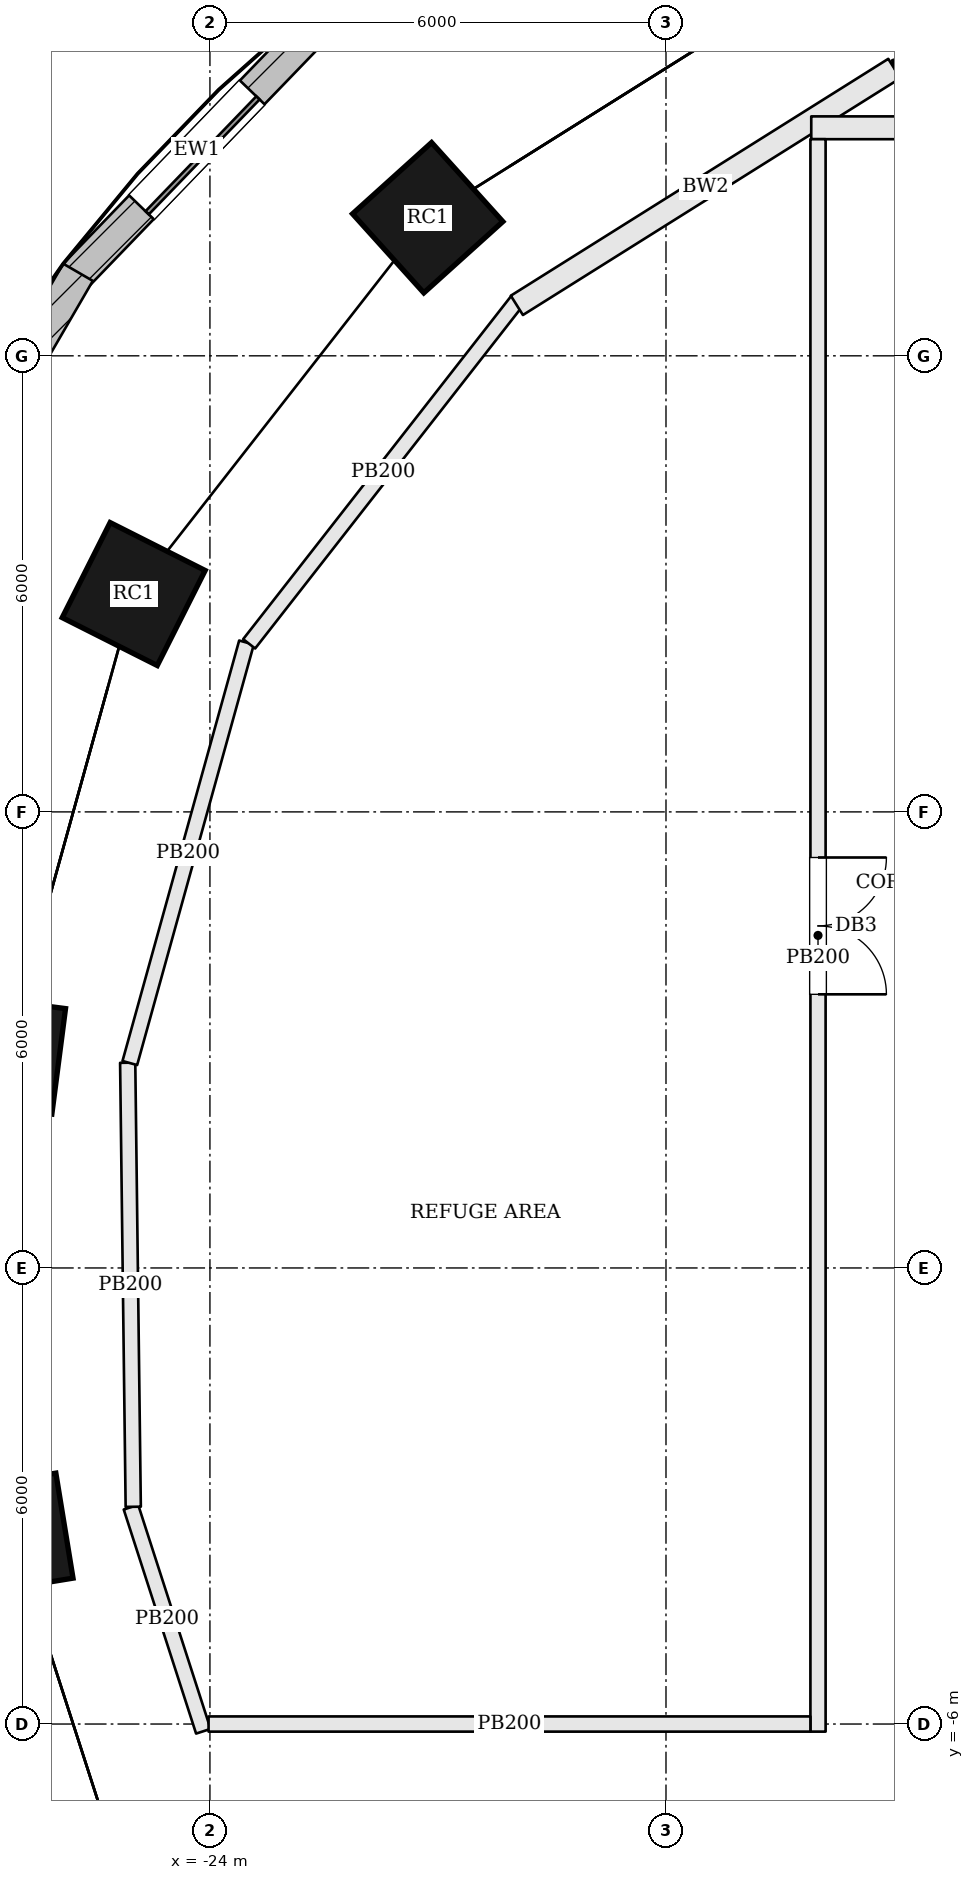
"""IFC4 building model, lengths in metres.
Left out: names, types, materials, properties, quantities, classifications, styles, units other than length and angle.
Written with IfcOpenShell. Run it as: python <this file> out.ifc"""

import sys

from ifc_helpers import new_model, si_unit, direction, frame, frame_2d, origin, origin_2d, place, context, subcontext, project, spatial, rectangle, extrude, element, fill, save


model = new_model("IFC4")
c1 = context("Model", 3, precision=1e-05, world=origin(), true_north=direction((0.0, 1.0)))
c2 = subcontext(c1, "Body", "Model", "MODEL_VIEW")
j1 = project(units=[si_unit("LENGTHUNIT", "METRE"), si_unit("PLANEANGLEUNIT", "RADIAN")], contexts=[c1])
p1 = place(None, origin())
s1 = spatial("IfcSite", under=j1, at=p1, CompositionType="ELEMENT")
p2 = place(p1, origin())
s2 = spatial("IfcBuilding", under=s1, at=p2, CompositionType="ELEMENT")
p3 = place(p2, frame((0.0, 0.0, 33.0)))
s3 = spatial("IfcBuildingStorey", under=s2, at=p3, CompositionType="ELEMENT", Elevation=33.0)
for number, where, z_axis, x_axis in (
    (1, (-21.135, 13.817, 0.0), (0.0, 0.0, 1.0), (-0.743, -0.67, 0.0)),
    (2, (-25.003, 8.866, 0.0), (0.0, 0.0, 1.0), (-0.45, -0.893, 0.0)),
    (3, (-26.684, 2.808, 0.0), (0.0, 0.0, 1.0), (-0.128, -0.992, 0.0)),
    (4, (-26.605, -3.503, 0.0), (0.0, 0.0, 1.0), (0.161, -0.987, 0.0)),
):
    element("IfcColumn", number, at=place(p3, frame(where, z_axis=z_axis, x_axis=x_axis)), inside=s3, PredefinedType="COLUMN", context=c2, shape_type="SweptSolid", body=[
        extrude(rectangle(XDim=1.4, YDim=1.4, at=origin_2d()), origin(), (0.0, 0.0, 1.0), 4.5),
    ])
p4 = place(p3, frame((-22.577, 16.365, 0.0), z_axis=(0.0, 0.0, 1.0), x_axis=(-0.694191591241, -0.719790271294, 0.0)))
e5 = element("IfcWall", 5, at=p4, inside=s3, PredefinedType="SOLIDWALL", context=c2, shape_type="SweptSolid", body=[
    extrude(rectangle(XDim=4.597, YDim=0.45, at=frame_2d((2.298, 0.0))), origin(), (0.0, 0.0, 1.0), 4.3),
])
p5 = place(p4, frame((1.249, 0.0, 1.2)))
e6 = element("IfcOpeningElement", 6, at=p5, cuts=e5, PredefinedType="OPENING", context=c2, shape_type="SweptSolid", body=[
    extrude(rectangle(XDim=2.1, YDim=1.8, at=frame_2d((1.05, 0.9))), frame((0.0, 0.235, 0.0), z_axis=(0.0, -1.0, 0.0), x_axis=(1.0, 0.0, 0.0)), (0.0, 0.0, 1.0), 0.47),
])
p6 = place(p3, frame((-25.735, 13.099, 0.0), z_axis=(0.0, 0.0, 1.0), x_axis=(-0.502106426501, -0.864805837438, 0.0)))
e7 = element("IfcWall", 7, at=p6, inside=s3, PredefinedType="SOLIDWALL", context=c2, shape_type="SweptSolid", body=[
    extrude(rectangle(XDim=4.657, YDim=0.45, at=frame_2d((2.328, 0.0))), origin(), (0.0, 0.0, 1.0), 4.3),
])
p7 = place(p6, frame((1.278, 0.0, 1.2)))
e8 = element("IfcOpeningElement", 8, at=p7, cuts=e7, PredefinedType="OPENING", context=c2, shape_type="SweptSolid", body=[
    extrude(rectangle(XDim=2.1, YDim=1.8, at=frame_2d((1.05, 0.9))), frame((0.0, 0.235, 0.0), z_axis=(0.0, -1.0, 0.0), x_axis=(1.0, 0.0, 0.0)), (0.0, 0.0, 1.0), 0.47),
])
p8 = place(p3, frame((-24.087, -6.095, 0.0), z_axis=(0.0, 0.0, 1.0), x_axis=(-0.307348144774, 0.951597140551, 0.0)))
e9 = element("IfcWall", 9, at=p8, inside=s3, PredefinedType="PARTITIONING", context=c2, shape_type="SweptSolid", body=[
    extrude(rectangle(XDim=3.098, YDim=0.2, at=frame_2d((1.549, 0.0))), origin(), (0.0, 0.0, 1.0), 4.3),
])
p9 = place(p3, frame((-25.009, -3.142, 0.0), z_axis=(0.0, 0.0, 1.0), x_axis=(-0.012494323245, 0.999921942897, 0.0)))
e10 = element("IfcWall", 10, at=p9, inside=s3, PredefinedType="PARTITIONING", context=c2, shape_type="SweptSolid", body=[
    extrude(rectangle(XDim=5.843, YDim=0.2, at=frame_2d((2.921, 0.0))), origin(), (0.0, 0.0, 1.0), 4.3),
])
p10 = place(p3, frame((-25.054, 2.696, 0.0), z_axis=(0.0, 0.0, 1.0), x_axis=(0.267360914268, 0.96359646197, 0.0)))
e11 = element("IfcWall", 11, at=p10, inside=s3, PredefinedType="PARTITIONING", context=c2, shape_type="SweptSolid", body=[
    extrude(rectangle(XDim=5.741, YDim=0.2, at=frame_2d((2.871, 0.0))), origin(), (0.0, 0.0, 1.0), 4.3),
])
p11 = place(p3, frame((-23.484, 8.211, 0.0), z_axis=(0.0, 0.0, 1.0), x_axis=(0.615543213925, 0.78810313525, 0.0)))
e12 = element("IfcWall", 12, at=p11, inside=s3, PredefinedType="PARTITIONING", context=c2, shape_type="SweptSolid", body=[
    extrude(rectangle(XDim=5.733, YDim=0.2, at=frame_2d((2.866, 0.0))), origin(), (0.0, 0.0, 1.0), 4.3),
])
p12 = place(p3, frame((-19.962, 12.664, 0.0), z_axis=(0.0, 0.0, 1.0), x_axis=(0.847051762776, 0.531510405522, 0.0)))
e13 = element("IfcWall", 13, at=p12, inside=s3, PredefinedType="SOLIDWALL", context=c2, shape_type="SweptSolid", body=[
    extrude(rectangle(XDim=5.863, YDim=0.3, at=frame_2d((2.931, 0.0))), origin(), (0.0, 0.0, 1.0), 4.3),
])
p13 = place(p3, frame((-16.089, 15.0, 0.0), z_axis=(0.0, 0.0, 1.0), x_axis=(1.0, 0.0, 0.0)))
e14 = element("IfcWall", 14, at=p13, inside=s3, PredefinedType="SOLIDWALL", context=c2, shape_type="SweptSolid", body=[
    extrude(rectangle(XDim=32.105, YDim=0.3, at=frame_2d((16.053, 0.0))), origin(), (0.0, 0.0, 1.0), 4.3),
])
p14 = place(p13, frame((3.089, 0.0, 0.0)))
e15 = element("IfcOpeningElement", 15, at=p14, cuts=e14, PredefinedType="OPENING", context=c2, shape_type="SweptSolid", body=[
    extrude(rectangle(XDim=1.0, YDim=2.1, at=frame_2d((0.5, 1.05))), frame((0.0, 0.16, 0.0), z_axis=(0.0, -1.0, 0.0), x_axis=(1.0, 0.0, 0.0)), (0.0, 0.0, 1.0), 0.32),
])
p15 = place(p13, frame((15.589, 0.0, 0.0)))
e16 = element("IfcOpeningElement", 16, at=p15, cuts=e14, PredefinedType="OPENING", context=c2, shape_type="SweptSolid", body=[
    extrude(rectangle(XDim=1.0, YDim=2.1, at=frame_2d((0.5, 1.05))), frame((0.0, 0.16, 0.0), z_axis=(0.0, -1.0, 0.0), x_axis=(1.0, 0.0, 0.0)), (0.0, 0.0, 1.0), 0.32),
])
p16 = place(p13, frame((28.089, 0.0, 0.0)))
e17 = element("IfcOpeningElement", 17, at=p16, cuts=e14, PredefinedType="OPENING", context=c2, shape_type="SweptSolid", body=[
    extrude(rectangle(XDim=1.0, YDim=2.1, at=frame_2d((0.5, 1.05))), frame((0.0, 0.16, 0.0), z_axis=(0.0, -1.0, 0.0), x_axis=(1.0, 0.0, 0.0)), (0.0, 0.0, 1.0), 0.32),
])
p17 = place(p3, frame((-16.0, 14.85, 0.0), z_axis=(0.0, 0.0, 1.0), x_axis=(0.0, -1.0, 0.0)))
e18 = element("IfcWall", 18, at=p17, inside=s3, PredefinedType="PARTITIONING", context=c2, shape_type="SweptSolid", body=[
    extrude(rectangle(XDim=20.95, YDim=0.2, at=frame_2d((10.475, 0.0))), origin(), (0.0, 0.0, 1.0), 4.3),
])
p18 = place(p17, frame((9.45, 0.0, 0.0)))
e19 = element("IfcOpeningElement", 19, at=p18, cuts=e18, PredefinedType="OPENING", context=c2, shape_type="SweptSolid", body=[
    extrude(rectangle(XDim=1.8, YDim=2.1, at=frame_2d((0.9, 1.05))), frame((0.0, 0.11, 0.0), z_axis=(0.0, -1.0, 0.0), x_axis=(1.0, 0.0, 0.0)), (0.0, 0.0, 1.0), 0.22),
])
p19 = place(p3, frame((-16.1, -6.0, 0.0), z_axis=(0.0, 0.0, 1.0), x_axis=(-1.0, 0.0, 0.0)))
e20 = element("IfcWall", 20, at=p19, inside=s3, PredefinedType="PARTITIONING", context=c2, shape_type="SweptSolid", body=[
    extrude(rectangle(XDim=7.918, YDim=0.2, at=frame_2d((3.959, 0.0))), origin(), (0.0, 0.0, 1.0), 4.3),
])
p20 = place(p3, frame((-14.98, 15.745, 0.0), z_axis=(0.0, 0.0, 1.0), x_axis=(0.953907270772, 0.300101514107, 0.0)))
e21 = element("IfcWall", 21, at=p20, inside=s3, PredefinedType="SOLIDWALL", context=c2, shape_type="SweptSolid", body=[
    extrude(rectangle(XDim=5.958, YDim=0.3, at=frame_2d((2.979, 0.0))), origin(), (0.0, 0.0, 1.0), 4.3),
])
p21 = place(p5, origin())
e22 = element("IfcWindow", 22, at=p21, inside=s3, PartitioningType="SINGLE_PANEL", PredefinedType="WINDOW", context=c2, shape_type="SweptSolid", body=[
    extrude(rectangle(XDim=2.1, YDim=1.8, at=frame_2d((1.05, 0.9))), frame((0.0, 0.135, 0.0), z_axis=(0.0, -1.0, 0.0), x_axis=(1.0, 0.0, 0.0)), (0.0, 0.0, 1.0), 0.06),
])
fill(e6, e22)
p22 = place(p18, origin())
e23 = element("IfcDoor", 23, at=p22, inside=s3, OperationType="DOUBLE_DOOR_SINGLE_SWING", PredefinedType="DOOR", context=c2, shape_type="SweptSolid", body=[
    extrude(rectangle(XDim=1.8, YDim=2.1, at=frame_2d((0.9, 1.05))), frame((0.0, 0.025, 0.0), z_axis=(0.0, -1.0, 0.0), x_axis=(1.0, 0.0, 0.0)), (0.0, 0.0, 1.0), 0.05),
])
fill(e19, e23)
save(model, sys.argv[1])
